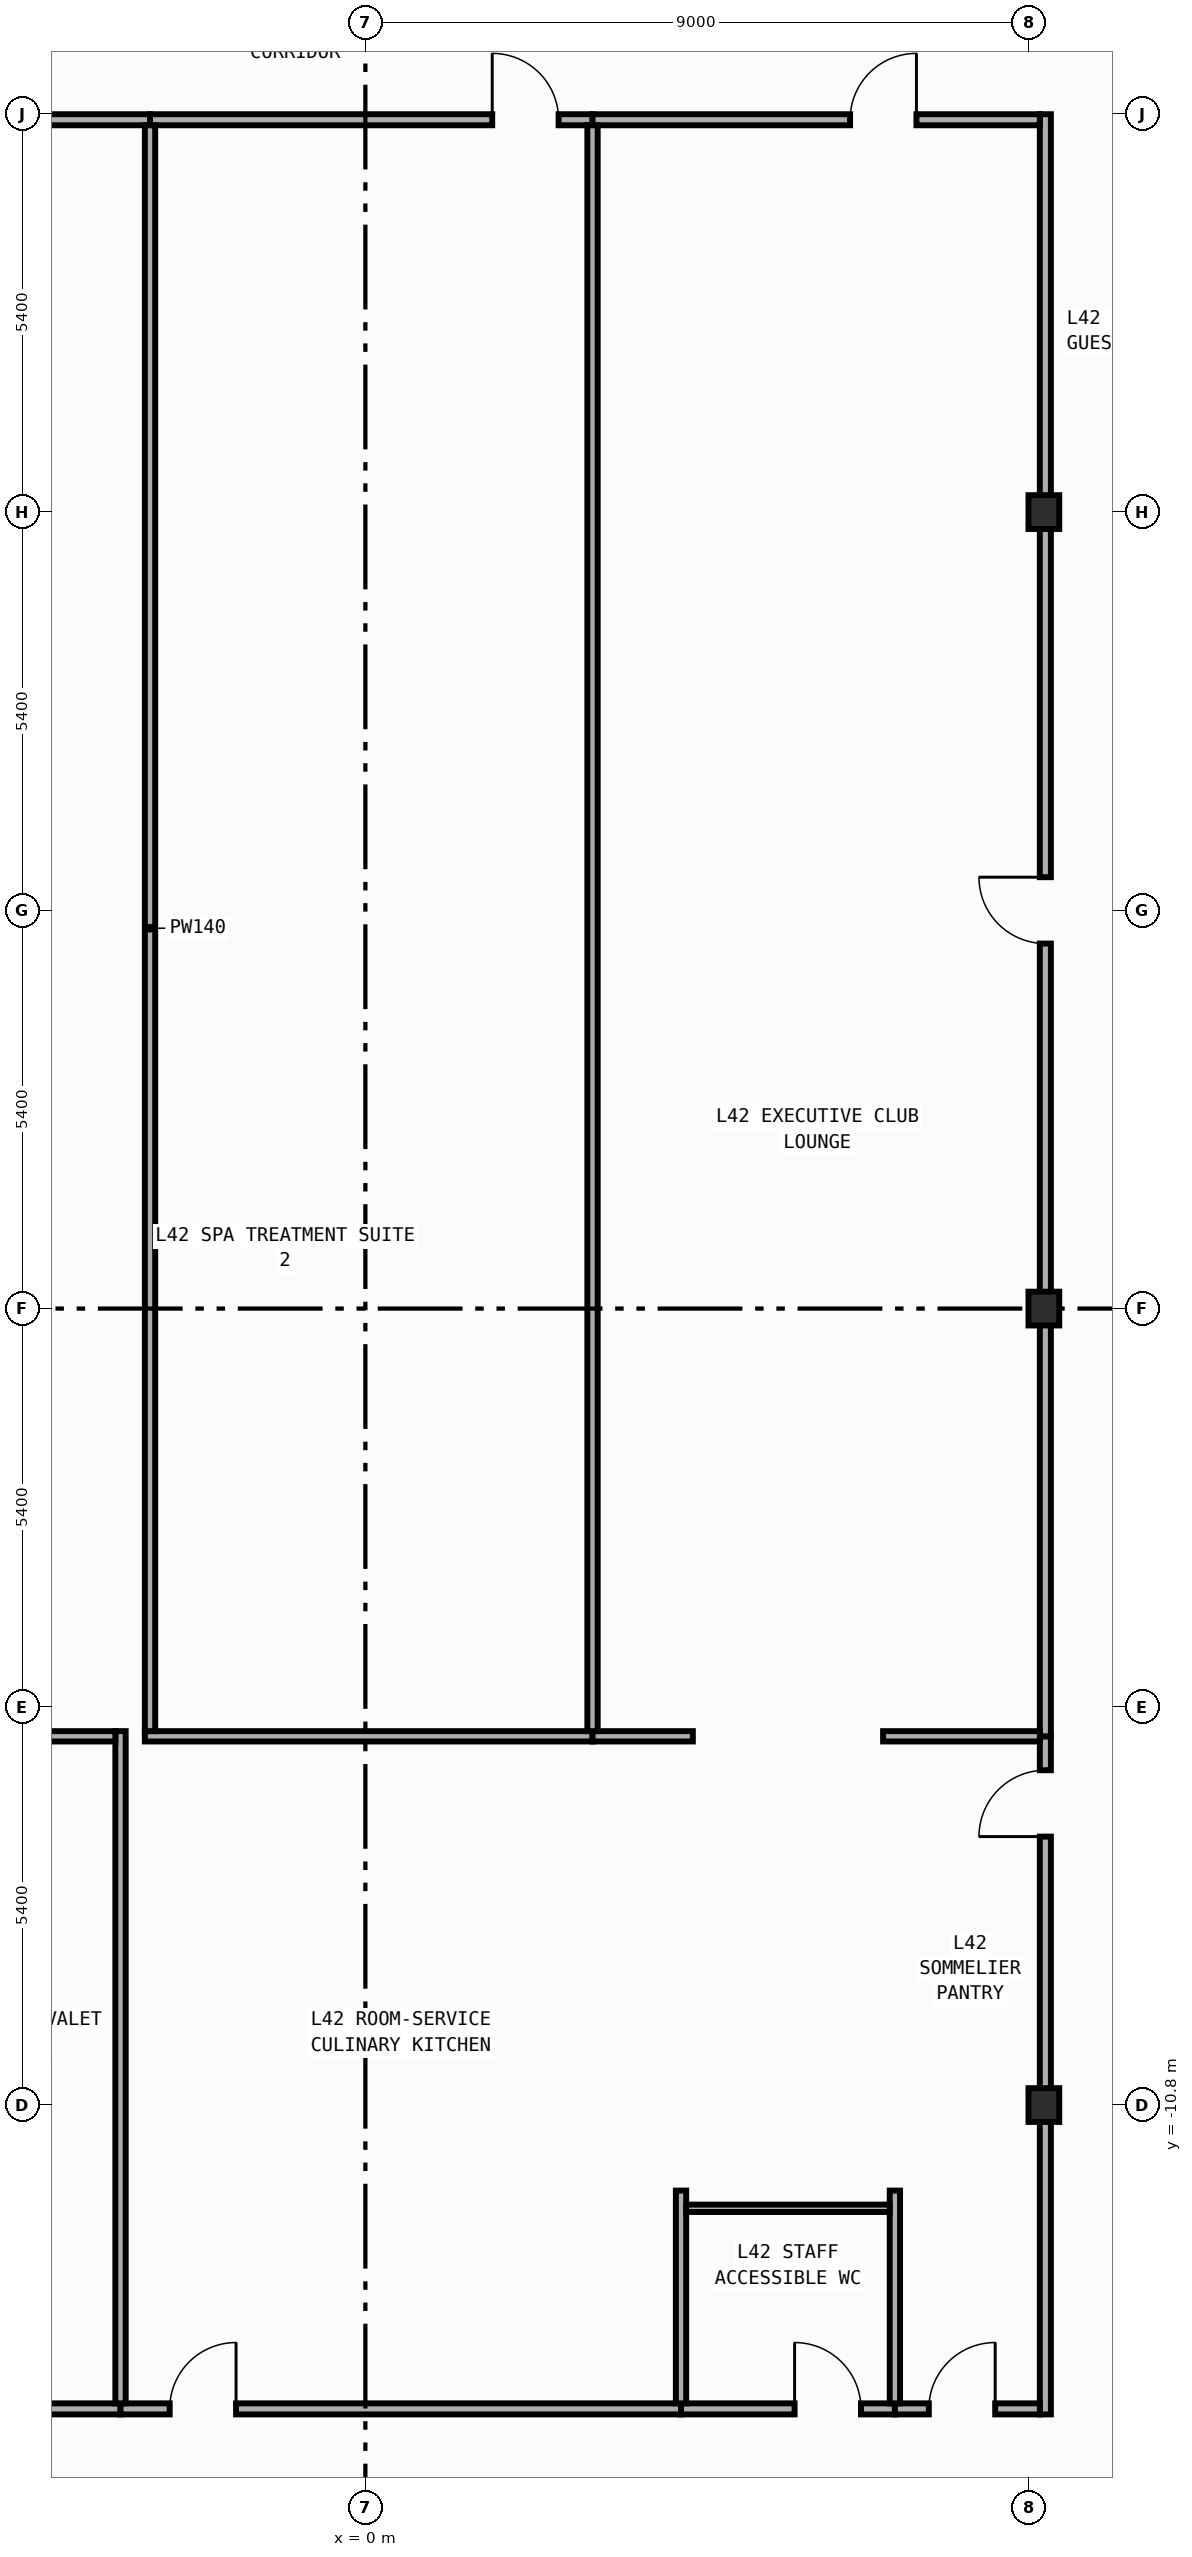
"""IFC4 building model, lengths in metres.
Left out: names, types, materials, properties, quantities, classifications, styles, units other than length and angle.
Written with IfcOpenShell. Run it as: python <this file> out.ifc"""

import sys

from ifc_helpers import new_model, si_unit, direction, frame, frame_2d, origin, origin_2d, place, context, subcontext, project, spatial, rectangle, i_section, extrude, element, fill, save


model = new_model("IFC4")
c1 = context("Model", 3, precision=1e-05, world=origin(), true_north=direction((0.0, 1.0)))
c2 = subcontext(c1, "Body", "Model", "MODEL_VIEW")
j1 = project(units=[si_unit("LENGTHUNIT", "METRE"), si_unit("PLANEANGLEUNIT", "RADIAN")], contexts=[c1])
p1 = place(None, origin())
s1 = spatial("IfcSite", under=j1, at=p1, CompositionType="ELEMENT")
p2 = place(p1, origin())
s2 = spatial("IfcBuilding", under=s1, at=p2, CompositionType="ELEMENT")
p3 = place(p2, frame((0.0, 0.0, 184.0)))
s3 = spatial("IfcBuildingStorey", under=s2, at=p3, CompositionType="ELEMENT", Elevation=184.0)
for number, where, z_axis, x_axis in (
    (1, (9.2, -10.8, 0.0), (0.0, 0.0, 1.0), (1.0, 0.0, 0.0)),
    (2, (9.2, 0.0, 0.0), (0.0, 0.0, 1.0), (1.0, 0.0, 0.0)),
    (3, (9.2, 10.8, 0.0), (0.0, 0.0, 1.0), (1.0, 0.0, 0.0)),
):
    element("IfcColumn", number, at=place(p3, frame(where, z_axis=z_axis, x_axis=x_axis)), inside=s3, PredefinedType="COLUMN", context=c2, shape_type="SweptSolid", body=[
        extrude(i_section(OverallWidth=0.417, OverallDepth=0.458, WebThickness=0.03, FlangeThickness=0.05, FilletRadius=0.022, at=origin_2d()), origin(), (0.0, 0.0, 1.0), 3.8),
    ])
p4 = place(p3, frame((9.22, -14.995, 0.0), z_axis=(0.0, 0.0, 1.0), x_axis=(0.0, 1.0, 0.0)))
e4 = element("IfcWall", 4, at=p4, inside=s3, PredefinedType="PARTITIONING", context=c2, shape_type="SweptSolid", body=[
    extrude(rectangle(XDim=9.195, YDim=0.15, at=frame_2d((4.598, 0.0))), origin(), (0.0, 0.0, 1.0), 2.952),
])
p5 = place(p4, frame((7.835, 0.0, 0.0)))
e5 = element("IfcOpeningElement", 5, at=p5, cuts=e4, PredefinedType="OPENING", context=c2, shape_type="SweptSolid", body=[
    extrude(rectangle(XDim=0.9, YDim=2.15, at=frame_2d((0.45, 1.075))), frame((0.0, 0.085, 0.0), z_axis=(0.0, -1.0, 0.0), x_axis=(1.0, 0.0, 0.0)), (0.0, 0.0, 1.0), 0.17),
])
p6 = place(p3, frame((9.22, -5.8, 0.0), z_axis=(0.0, 0.0, 1.0), x_axis=(0.0, 1.0, 0.0)))
e6 = element("IfcWall", 6, at=p6, inside=s3, PredefinedType="PARTITIONING", context=c2, shape_type="SweptSolid", body=[
    extrude(rectangle(XDim=21.995, YDim=0.15, at=frame_2d((10.998, 0.0))), origin(), (0.0, 0.0, 1.0), 2.952),
])
p7 = place(p6, frame((10.749, 0.0, 0.0)))
e7 = element("IfcOpeningElement", 7, at=p7, cuts=e6, PredefinedType="OPENING", context=c2, shape_type="SweptSolid", body=[
    extrude(rectangle(XDim=0.9, YDim=2.15, at=frame_2d((0.45, 1.075))), frame((0.0, 0.085, 0.0), z_axis=(0.0, -1.0, 0.0), x_axis=(1.0, 0.0, 0.0)), (0.0, 0.0, 1.0), 0.17),
])
p8 = place(p3, frame((-9.145, 16.12, 0.0), z_axis=(0.0, 0.0, 1.0), x_axis=(1.0, 0.0, 0.0)))
e8 = element("IfcWall", 8, at=p8, inside=s3, PredefinedType="PARTITIONING", context=c2, shape_type="SweptSolid", body=[
    extrude(rectangle(XDim=6.225, YDim=0.15, at=frame_2d((3.113, 0.0))), origin(), (0.0, 0.0, 1.0), 3.54),
])
p9 = place(p8, frame((1.661, 0.0, 0.0)))
e9 = element("IfcOpeningElement", 9, at=p9, cuts=e8, PredefinedType="OPENING", context=c2, shape_type="SweptSolid", body=[
    extrude(rectangle(XDim=0.9, YDim=2.15, at=frame_2d((0.45, 1.075))), frame((0.0, 0.085, 0.0), z_axis=(0.0, -1.0, 0.0), x_axis=(1.0, 0.0, 0.0)), (0.0, 0.0, 1.0), 0.17),
])
p10 = place(p3, frame((-2.92, 16.12, 0.0), z_axis=(0.0, 0.0, 1.0), x_axis=(1.0, 0.0, 0.0)))
e10 = element("IfcWall", 10, at=p10, inside=s3, PredefinedType="PARTITIONING", context=c2, shape_type="SweptSolid", body=[
    extrude(rectangle(XDim=6.0, YDim=0.15, at=frame_2d((3.0, 0.0))), origin(), (0.0, 0.0, 1.0), 3.54),
])
p11 = place(p10, frame((4.64, 0.0, 0.0)))
e11 = element("IfcOpeningElement", 11, at=p11, cuts=e10, PredefinedType="OPENING", context=c2, shape_type="SweptSolid", body=[
    extrude(rectangle(XDim=0.9, YDim=2.15, at=frame_2d((0.45, 1.075))), frame((0.0, 0.085, 0.0), z_axis=(0.0, -1.0, 0.0), x_axis=(1.0, 0.0, 0.0)), (0.0, 0.0, 1.0), 0.17),
])
p12 = place(p3, frame((3.08, 16.12, 0.0), z_axis=(0.0, 0.0, 1.0), x_axis=(1.0, 0.0, 0.0)))
e12 = element("IfcWall", 12, at=p12, inside=s3, PredefinedType="PARTITIONING", context=c2, shape_type="SweptSolid", body=[
    extrude(rectangle(XDim=6.065, YDim=0.15, at=frame_2d((3.032, 0.0))), origin(), (0.0, 0.0, 1.0), 3.54),
])
p13 = place(p12, frame((3.492, 0.0, 0.0)))
e13 = element("IfcOpeningElement", 13, at=p13, cuts=e12, PredefinedType="OPENING", context=c2, shape_type="SweptSolid", body=[
    extrude(rectangle(XDim=0.9, YDim=2.15, at=frame_2d((0.45, 1.075))), frame((0.0, 0.085, 0.0), z_axis=(0.0, -1.0, 0.0), x_axis=(1.0, 0.0, 0.0)), (0.0, 0.0, 1.0), 0.17),
])
p14 = place(p3, frame((-6.12, -14.92, 0.0), z_axis=(0.0, 0.0, 1.0), x_axis=(1.0, 0.0, 0.0)))
e14 = element("IfcWall", 14, at=p14, inside=s3, PredefinedType="PARTITIONING", context=c2, shape_type="SweptSolid", body=[
    extrude(rectangle(XDim=2.8, YDim=0.15, at=frame_2d((1.4, 0.0))), origin(), (0.0, 0.0, 1.0), 3.54),
])
p15 = place(p14, frame((0.46, 0.0, 0.0)))
e15 = element("IfcOpeningElement", 15, at=p15, cuts=e14, PredefinedType="OPENING", context=c2, shape_type="SweptSolid", body=[
    extrude(rectangle(XDim=0.9, YDim=2.15, at=frame_2d((0.45, 1.075))), frame((0.0, 0.085, 0.0), z_axis=(0.0, -1.0, 0.0), x_axis=(1.0, 0.0, 0.0)), (0.0, 0.0, 1.0), 0.17),
])
p16 = place(p3, frame((-3.32, -14.92, 0.0), z_axis=(0.0, 0.0, 1.0), x_axis=(1.0, 0.0, 0.0)))
e16 = element("IfcWall", 16, at=p16, inside=s3, PredefinedType="PARTITIONING", context=c2, shape_type="SweptSolid", body=[
    extrude(rectangle(XDim=7.6, YDim=0.15, at=frame_2d((3.8, 0.0))), origin(), (0.0, 0.0, 1.0), 3.54),
])
p17 = place(p16, frame((0.667, 0.0, 0.0)))
e17 = element("IfcOpeningElement", 17, at=p17, cuts=e16, PredefinedType="OPENING", context=c2, shape_type="SweptSolid", body=[
    extrude(rectangle(XDim=0.9, YDim=2.15, at=frame_2d((0.45, 1.075))), frame((0.0, 0.085, 0.0), z_axis=(0.0, -1.0, 0.0), x_axis=(1.0, 0.0, 0.0)), (0.0, 0.0, 1.0), 0.17),
])
p18 = place(p3, frame((4.28, -14.92, 0.0), z_axis=(0.0, 0.0, 1.0), x_axis=(1.0, 0.0, 0.0)))
e18 = element("IfcWall", 18, at=p18, inside=s3, PredefinedType="PARTITIONING", context=c2, shape_type="SweptSolid", body=[
    extrude(rectangle(XDim=2.9, YDim=0.15, at=frame_2d((1.45, 0.0))), origin(), (0.0, 0.0, 1.0), 3.54),
])
p19 = place(p18, frame((1.54, 0.0, 0.0)))
e19 = element("IfcOpeningElement", 19, at=p19, cuts=e18, PredefinedType="OPENING", context=c2, shape_type="SweptSolid", body=[
    extrude(rectangle(XDim=0.9, YDim=2.15, at=frame_2d((0.45, 1.075))), frame((0.0, 0.085, 0.0), z_axis=(0.0, -1.0, 0.0), x_axis=(1.0, 0.0, 0.0)), (0.0, 0.0, 1.0), 0.17),
])
p20 = place(p3, frame((7.18, -14.92, 0.0), z_axis=(0.0, 0.0, 1.0), x_axis=(1.0, 0.0, 0.0)))
e20 = element("IfcWall", 20, at=p20, inside=s3, PredefinedType="PARTITIONING", context=c2, shape_type="SweptSolid", body=[
    extrude(rectangle(XDim=1.965, YDim=0.15, at=frame_2d((0.982, 0.0))), origin(), (0.0, 0.0, 1.0), 3.54),
])
p21 = place(p20, frame((0.46, 0.0, 0.0)))
e21 = element("IfcOpeningElement", 21, at=p21, cuts=e20, PredefinedType="OPENING", context=c2, shape_type="SweptSolid", body=[
    extrude(rectangle(XDim=0.9, YDim=2.15, at=frame_2d((0.45, 1.075))), frame((0.0, 0.085, 0.0), z_axis=(0.0, -1.0, 0.0), x_axis=(1.0, 0.0, 0.0)), (0.0, 0.0, 1.0), 0.17),
])
p22 = place(p3, frame((-3.32, -14.845, 0.0), z_axis=(0.0, 0.0, 1.0), x_axis=(0.0, 1.0, 0.0)))
e22 = element("IfcWall", 22, at=p22, inside=s3, PredefinedType="PARTITIONING", context=c2, shape_type="SweptSolid", body=[
    extrude(rectangle(XDim=9.115, YDim=0.14, at=frame_2d((4.558, 0.0))), origin(), (0.0, 0.0, 1.0), 3.54),
])
p23 = place(p3, frame((-6.12, -5.8, 0.0), z_axis=(0.0, 0.0, 1.0), x_axis=(1.0, 0.0, 0.0)))
e23 = element("IfcWall", 23, at=p23, inside=s3, PredefinedType="PARTITIONING", context=c2, shape_type="SweptSolid", body=[
    extrude(rectangle(XDim=2.73, YDim=0.14, at=frame_2d((1.365, 0.0))), origin(), (0.0, 0.0, 1.0), 3.54),
])
p24 = place(p3, frame((4.28, -14.845, 0.0), z_axis=(0.0, 0.0, 1.0), x_axis=(0.0, 1.0, 0.0)))
e24 = element("IfcWall", 24, at=p24, inside=s3, PredefinedType="PARTITIONING", context=c2, shape_type="SweptSolid", body=[
    extrude(rectangle(XDim=2.885, YDim=0.14, at=frame_2d((1.442, 0.0))), origin(), (0.0, 0.0, 1.0), 3.54),
])
p25 = place(p3, frame((-2.99, -5.8, 0.0), z_axis=(0.0, 0.0, 1.0), x_axis=(1.0, 0.0, 0.0)))
e25 = element("IfcWall", 25, at=p25, inside=s3, PredefinedType="PARTITIONING", context=c2, shape_type="SweptSolid", body=[
    extrude(rectangle(XDim=6.07, YDim=0.14, at=frame_2d((3.035, 0.0))), origin(), (0.0, 0.0, 1.0), 3.54),
])
p26 = place(p3, frame((3.08, -5.8, 0.0), z_axis=(0.0, 0.0, 1.0), x_axis=(1.0, 0.0, 0.0)))
e26 = element("IfcWall", 26, at=p26, inside=s3, PredefinedType="PARTITIONING", context=c2, shape_type="SweptSolid", body=[
    extrude(rectangle(XDim=1.36, YDim=0.14, at=frame_2d((0.68, 0.0))), origin(), (0.0, 0.0, 1.0), 3.54),
])
p27 = place(p3, frame((7.18, -14.845, 0.0), z_axis=(0.0, 0.0, 1.0), x_axis=(0.0, 1.0, 0.0)))
e27 = element("IfcWall", 27, at=p27, inside=s3, PredefinedType="PARTITIONING", context=c2, shape_type="SweptSolid", body=[
    extrude(rectangle(XDim=2.885, YDim=0.14, at=frame_2d((1.442, 0.0))), origin(), (0.0, 0.0, 1.0), 3.54),
])
p28 = place(p3, frame((7.02, -5.8, 0.0), z_axis=(0.0, 0.0, 1.0), x_axis=(1.0, 0.0, 0.0)))
e28 = element("IfcWall", 28, at=p28, inside=s3, PredefinedType="PARTITIONING", context=c2, shape_type="SweptSolid", body=[
    extrude(rectangle(XDim=2.125, YDim=0.14, at=frame_2d((1.062, 0.0))), origin(), (0.0, 0.0, 1.0), 3.54),
])
for number, where, z_axis, x_axis in (
    (29, (-2.92, -5.73, 0.0), (0.0, 0.0, 1.0), (0.0, 1.0, 0.0)),
    (30, (3.08, -5.73, 0.0), (0.0, 0.0, 1.0), (0.0, 1.0, 0.0)),
):
    element("IfcWall", number, at=place(p3, frame(where, z_axis=z_axis, x_axis=x_axis)), inside=s3, PredefinedType="PARTITIONING", context=c2, shape_type="SweptSolid", body=[
        extrude(rectangle(XDim=21.775, YDim=0.14, at=frame_2d((10.887, 0.0))), origin(), (0.0, 0.0, 1.0), 3.54),
    ])
p29 = place(p3, frame((4.35, -12.2, 0.0), z_axis=(0.0, 0.0, 1.0), x_axis=(1.0, 0.0, 0.0)))
e31 = element("IfcWall", 31, at=p29, inside=s3, PredefinedType="PARTITIONING", context=c2, shape_type="SweptSolid", body=[
    extrude(rectangle(XDim=2.76, YDim=0.1, at=frame_2d((1.38, 0.0))), origin(), (0.0, 0.0, 1.0), 3.54),
])
p30 = place(p5, origin())
e32 = element("IfcDoor", 32, at=p30, inside=s3, OperationType="SINGLE_SWING_LEFT", PredefinedType="DOOR", context=c2, shape_type="SweptSolid", body=[
    extrude(rectangle(XDim=0.9, YDim=2.15, at=frame_2d((0.45, 1.075))), frame((0.0, 0.025, 0.0), z_axis=(0.0, -1.0, 0.0), x_axis=(1.0, 0.0, 0.0)), (0.0, 0.0, 1.0), 0.05),
])
fill(e5, e32)
p31 = place(p7, origin())
e33 = element("IfcDoor", 33, at=p31, inside=s3, OperationType="SINGLE_SWING_RIGHT", PredefinedType="DOOR", context=c2, shape_type="SweptSolid", body=[
    extrude(rectangle(XDim=0.9, YDim=2.15, at=frame_2d((0.45, 1.075))), frame((0.0, 0.025, 0.0), z_axis=(0.0, -1.0, 0.0), x_axis=(1.0, 0.0, 0.0)), (0.0, 0.0, 1.0), 0.05),
])
fill(e7, e33)
p32 = place(p11, origin())
e34 = element("IfcDoor", 34, at=p32, inside=s3, OperationType="SINGLE_SWING_LEFT", PredefinedType="DOOR", context=c2, shape_type="SweptSolid", body=[
    extrude(rectangle(XDim=0.9, YDim=2.15, at=frame_2d((0.45, 1.075))), frame((0.0, 0.025, 0.0), z_axis=(0.0, -1.0, 0.0), x_axis=(1.0, 0.0, 0.0)), (0.0, 0.0, 1.0), 0.05),
])
fill(e11, e34)
p33 = place(p13, origin())
e35 = element("IfcDoor", 35, at=p33, inside=s3, OperationType="SINGLE_SWING_RIGHT", PredefinedType="DOOR", context=c2, shape_type="SweptSolid", body=[
    extrude(rectangle(XDim=0.9, YDim=2.15, at=frame_2d((0.45, 1.075))), frame((0.0, 0.025, 0.0), z_axis=(0.0, -1.0, 0.0), x_axis=(1.0, 0.0, 0.0)), (0.0, 0.0, 1.0), 0.05),
])
fill(e13, e35)
p34 = place(p17, origin())
e36 = element("IfcDoor", 36, at=p34, inside=s3, OperationType="SINGLE_SWING_RIGHT", PredefinedType="DOOR", context=c2, shape_type="SweptSolid", body=[
    extrude(rectangle(XDim=0.9, YDim=2.15, at=frame_2d((0.45, 1.075))), frame((0.0, 0.025, 0.0), z_axis=(0.0, -1.0, 0.0), x_axis=(1.0, 0.0, 0.0)), (0.0, 0.0, 1.0), 0.05),
])
fill(e17, e36)
p35 = place(p19, origin())
e37 = element("IfcDoor", 37, at=p35, inside=s3, OperationType="SINGLE_SWING_LEFT", PredefinedType="DOOR", context=c2, shape_type="SweptSolid", body=[
    extrude(rectangle(XDim=0.9, YDim=2.15, at=frame_2d((0.45, 1.075))), frame((0.0, 0.025, 0.0), z_axis=(0.0, -1.0, 0.0), x_axis=(1.0, 0.0, 0.0)), (0.0, 0.0, 1.0), 0.05),
])
fill(e19, e37)
p36 = place(p21, origin())
e38 = element("IfcDoor", 38, at=p36, inside=s3, OperationType="SINGLE_SWING_RIGHT", PredefinedType="DOOR", context=c2, shape_type="SweptSolid", body=[
    extrude(rectangle(XDim=0.9, YDim=2.15, at=frame_2d((0.45, 1.075))), frame((0.0, 0.025, 0.0), z_axis=(0.0, -1.0, 0.0), x_axis=(1.0, 0.0, 0.0)), (0.0, 0.0, 1.0), 0.05),
])
fill(e21, e38)
save(model, sys.argv[1])
